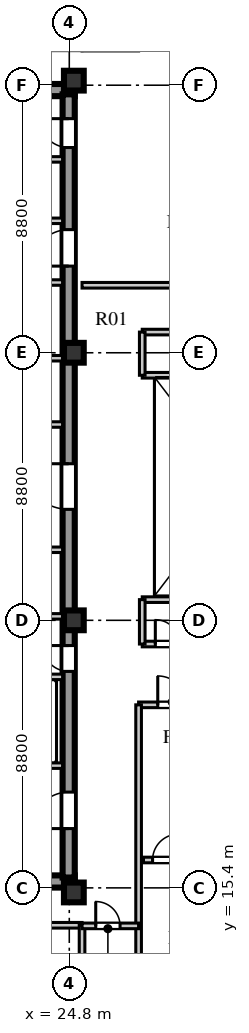
"""IFC4 building model, lengths in metres.
Left out: names, types, materials, properties, quantities, classifications, styles, units other than length and angle.
Written with IfcOpenShell. Run it as: python <this file> out.ifc"""

import sys

from ifc_helpers import new_model, si_unit, direction, frame, frame_2d, origin, origin_2d, place, context, subcontext, project, spatial, rectangle, extrude, element, fill, save


model = new_model("IFC4")
c1 = context("Model", 3, precision=1e-05, world=origin(), true_north=direction((0.0, 1.0)))
c2 = subcontext(c1, "Body", "Model", "MODEL_VIEW")
j1 = project(units=[si_unit("LENGTHUNIT", "METRE"), si_unit("PLANEANGLEUNIT", "RADIAN")], contexts=[c1])
p1 = place(None, origin())
s1 = spatial("IfcSite", under=j1, at=p1, CompositionType="ELEMENT")
p2 = place(p1, origin())
s2 = spatial("IfcBuilding", under=s1, at=p2, CompositionType="ELEMENT")
p3 = place(p2, frame((0.0, 0.0, 335.3)))
s3 = spatial("IfcBuildingStorey", under=s2, at=p3, CompositionType="ELEMENT", Elevation=335.3)
for number, where, z_axis, x_axis in (
    (1, (15.5, 15.61, 0.0), (0.0, 0.0, 1.0), (1.0, 0.0, 0.0)),
    (2, (15.5, 41.64, 0.0), (0.0, 0.0, 1.0), (1.0, 0.0, 0.0)),
):
    element("IfcWall", number, at=place(p3, frame(where, z_axis=z_axis, x_axis=x_axis)), inside=s3, PredefinedType="SHEAR", context=c2, shape_type="SweptSolid", body=[
        extrude(rectangle(XDim=9.48, YDim=0.4, at=frame_2d((4.74, 0.0))), origin(), (0.0, 0.0, 1.0), 3.56),
    ])
p4 = place(p3, frame((24.78, 15.74, 0.0), z_axis=(0.0, 0.0, 1.0), x_axis=(0.0, 1.0, 0.0)))
e3 = element("IfcWall", 3, at=p4, inside=s3, PredefinedType="SHEAR", context=c2, shape_type="SweptSolid", body=[
    extrude(rectangle(XDim=25.76, YDim=0.4, at=frame_2d((12.88, 0.0))), origin(), (0.0, 0.0, 1.0), 3.56),
])
p5 = place(p4, frame((1.61, 0.0, 0.0)))
e4 = element("IfcOpeningElement", 4, at=p5, cuts=e3, PredefinedType="OPENING", context=c2, shape_type="SweptSolid", body=[
    extrude(rectangle(XDim=1.2, YDim=2.1, at=frame_2d((0.6, 1.05))), frame((0.0, 0.21, 0.0), z_axis=(0.0, -1.0, 0.0), x_axis=(1.0, 0.0, 0.0)), (0.0, 0.0, 1.0), 0.42),
])
p6 = place(p4, frame((6.78, 0.0, 0.0)))
e5 = element("IfcOpeningElement", 5, at=p6, cuts=e3, PredefinedType="OPENING", context=c2, shape_type="SweptSolid", body=[
    extrude(rectangle(XDim=0.85, YDim=2.06, at=frame_2d((0.425, 1.03))), frame((0.0, 0.21, 0.0), z_axis=(0.0, -1.0, 0.0), x_axis=(1.0, 0.0, 0.0)), (0.0, 0.0, 1.0), 0.42),
])
p7 = place(p4, frame((12.11, 0.0, 0.0)))
e6 = element("IfcOpeningElement", 6, at=p7, cuts=e3, PredefinedType="OPENING", context=c2, shape_type="SweptSolid", body=[
    extrude(rectangle(XDim=1.5, YDim=2.12, at=frame_2d((0.75, 1.06))), frame((0.0, 0.21, 0.0), z_axis=(0.0, -1.0, 0.0), x_axis=(1.0, 0.0, 0.0)), (0.0, 0.0, 1.0), 0.42),
])
p8 = place(p4, frame((20.11, 0.0, 0.0)))
e7 = element("IfcOpeningElement", 7, at=p8, cuts=e3, PredefinedType="OPENING", context=c2, shape_type="SweptSolid", body=[
    extrude(rectangle(XDim=1.2, YDim=2.12, at=frame_2d((0.6, 1.06))), frame((0.0, 0.21, 0.0), z_axis=(0.0, -1.0, 0.0), x_axis=(1.0, 0.0, 0.0)), (0.0, 0.0, 1.0), 0.42),
])
p9 = place(p4, frame((24.01, 0.0, 0.0)))
e8 = element("IfcOpeningElement", 8, at=p9, cuts=e3, PredefinedType="OPENING", context=c2, shape_type="SweptSolid", body=[
    extrude(rectangle(XDim=0.95, YDim=2.1, at=frame_2d((0.475, 1.05))), frame((0.0, 0.21, 0.0), z_axis=(0.0, -1.0, 0.0), x_axis=(1.0, 0.0, 0.0)), (0.0, 0.0, 1.0), 0.42),
])
for number, where, z_axis, x_axis in (
    (9, (24.95, 15.25, 0.0), (0.0, 0.0, 1.0), (1.0, 0.0, 0.0)),
    (10, (24.95, 24.2, 0.0), (0.0, 0.0, 1.0), (1.0, 0.0, 0.0)),
    (11, (24.95, 33.0, 0.0), (0.0, 0.0, 1.0), (1.0, 0.0, 0.0)),
    (12, (24.95, 41.95, 0.0), (0.0, 0.0, 1.0), (1.0, 0.0, 0.0)),
):
    element("IfcColumn", number, at=place(p3, frame(where, z_axis=z_axis, x_axis=x_axis)), inside=s3, PredefinedType="COLUMN", context=c2, shape_type="SweptSolid", body=[
        extrude(rectangle(XDim=0.65, YDim=0.65, at=origin_2d()), origin(), (0.0, 0.0, 1.0), 3.56),
    ])
p10 = place(p3, frame((19.64, 19.42, 0.0), z_axis=(0.0, 0.0, 1.0), x_axis=(1.0, 0.0, 0.0)))
e13 = element("IfcWall", 13, at=p10, inside=s3, PredefinedType="SOLIDWALL", context=c2, shape_type="SweptSolid", body=[
    extrude(rectangle(XDim=4.94, YDim=0.18, at=frame_2d((2.47, 0.0))), origin(), (0.0, 0.0, 1.0), 3.56),
])
p11 = place(p10, frame((0.72, 0.0, 0.0)))
e14 = element("IfcOpeningElement", 14, at=p11, cuts=e13, PredefinedType="OPENING", context=c2, shape_type="SweptSolid", body=[
    extrude(rectangle(XDim=1.1, YDim=2.1, at=frame_2d((0.55, 1.05))), frame((0.0, 0.1, 0.0), z_axis=(0.0, -1.0, 0.0), x_axis=(1.0, 0.0, 0.0)), (0.0, 0.0, 1.0), 0.2),
])
p12 = place(p10, frame((3.02, 0.0, 0.0)))
e15 = element("IfcOpeningElement", 15, at=p12, cuts=e13, PredefinedType="OPENING", context=c2, shape_type="SweptSolid", body=[
    extrude(rectangle(XDim=1.1, YDim=2.1, at=frame_2d((0.55, 1.05))), frame((0.0, 0.1, 0.0), z_axis=(0.0, -1.0, 0.0), x_axis=(1.0, 0.0, 0.0)), (0.0, 0.0, 1.0), 0.2),
])
p13 = place(p3, frame((19.64, 22.34, 0.0), z_axis=(0.0, 0.0, 1.0), x_axis=(1.0, 0.0, 0.0)))
e16 = element("IfcWall", 16, at=p13, inside=s3, PredefinedType="SOLIDWALL", context=c2, shape_type="SweptSolid", body=[
    extrude(rectangle(XDim=4.94, YDim=0.18, at=frame_2d((2.47, 0.0))), origin(), (0.0, 0.0, 1.0), 3.56),
])
p14 = place(p3, frame((15.9, 26.52, 0.0), z_axis=(0.0, 0.0, 1.0), x_axis=(1.0, 0.0, 0.0)))
e17 = element("IfcWall", 17, at=p14, inside=s3, PredefinedType="SOLIDWALL", context=c2, shape_type="SweptSolid", body=[
    extrude(rectangle(XDim=8.68, YDim=0.18, at=frame_2d((4.34, 0.0))), origin(), (0.0, 0.0, 1.0), 3.56),
])
p15 = place(p14, frame((2.05, 0.0, 0.0)))
e18 = element("IfcOpeningElement", 18, at=p15, cuts=e17, PredefinedType="OPENING", context=c2, shape_type="SweptSolid", body=[
    extrude(rectangle(XDim=0.85, YDim=2.06, at=frame_2d((0.425, 1.03))), frame((0.0, 0.1, 0.0), z_axis=(0.0, -1.0, 0.0), x_axis=(1.0, 0.0, 0.0)), (0.0, 0.0, 1.0), 0.2),
])
p16 = place(p14, frame((5.2, 0.0, 0.0)))
e19 = element("IfcOpeningElement", 19, at=p16, cuts=e17, PredefinedType="OPENING", context=c2, shape_type="SweptSolid", body=[
    extrude(rectangle(XDim=0.95, YDim=2.1, at=frame_2d((0.475, 1.05))), frame((0.0, 0.1, 0.0), z_axis=(0.0, -1.0, 0.0), x_axis=(1.0, 0.0, 0.0)), (0.0, 0.0, 1.0), 0.2),
])
p17 = place(p3, frame((15.9, 24.33, 0.0), z_axis=(0.0, 0.0, 1.0), x_axis=(1.0, 0.0, 0.0)))
e20 = element("IfcWall", 20, at=p17, inside=s3, PredefinedType="SOLIDWALL", context=c2, shape_type="SweptSolid", body=[
    extrude(rectangle(XDim=8.68, YDim=0.18, at=frame_2d((4.34, 0.0))), origin(), (0.0, 0.0, 1.0), 2.96),
])
p18 = place(p3, frame((15.9, 30.64, 0.0), z_axis=(0.0, 0.0, 1.0), x_axis=(1.0, 0.0, 0.0)))
e21 = element("IfcWall", 21, at=p18, inside=s3, PredefinedType="SOLIDWALL", context=c2, shape_type="SweptSolid", body=[
    extrude(rectangle(XDim=8.68, YDim=0.18, at=frame_2d((4.34, 0.0))), origin(), (0.0, 0.0, 1.0), 3.56),
])
p19 = place(p18, frame((3.7, 0.0, 0.0)))
e22 = element("IfcOpeningElement", 22, at=p19, cuts=e21, PredefinedType="OPENING", context=c2, shape_type="SweptSolid", body=[
    extrude(rectangle(XDim=0.95, YDim=2.1, at=frame_2d((0.475, 1.05))), frame((0.0, 0.1, 0.0), z_axis=(0.0, -1.0, 0.0), x_axis=(1.0, 0.0, 0.0)), (0.0, 0.0, 1.0), 0.2),
])
p20 = place(p3, frame((15.9, 32.82, 0.0), z_axis=(0.0, 0.0, 1.0), x_axis=(1.0, 0.0, 0.0)))
e23 = element("IfcWall", 23, at=p20, inside=s3, PredefinedType="SOLIDWALL", context=c2, shape_type="SweptSolid", body=[
    extrude(rectangle(XDim=8.68, YDim=0.18, at=frame_2d((4.34, 0.0))), origin(), (0.0, 0.0, 1.0), 2.96),
])
p21 = place(p3, frame((22.02, 35.31, 0.0), z_axis=(0.0, 0.0, 1.0), x_axis=(1.0, 0.0, 0.0)))
e24 = element("IfcWall", 24, at=p21, inside=s3, PredefinedType="SOLIDWALL", context=c2, shape_type="SweptSolid", body=[
    extrude(rectangle(XDim=2.56, YDim=0.18, at=frame_2d((1.28, 0.0))), origin(), (0.0, 0.0, 1.0), 3.56),
])
p22 = place(p21, frame((0.55, 0.0, 0.0)))
e25 = element("IfcOpeningElement", 25, at=p22, cuts=e24, PredefinedType="OPENING", context=c2, shape_type="SweptSolid", body=[
    extrude(rectangle(XDim=1.0, YDim=2.1, at=frame_2d((0.5, 1.05))), frame((0.0, 0.1, 0.0), z_axis=(0.0, -1.0, 0.0), x_axis=(1.0, 0.0, 0.0)), (0.0, 0.0, 1.0), 0.2),
])
p23 = place(p3, frame((19.64, 37.34, 0.0), z_axis=(0.0, 0.0, 1.0), x_axis=(1.0, 0.0, 0.0)))
e26 = element("IfcWall", 26, at=p23, inside=s3, PredefinedType="SOLIDWALL", context=c2, shape_type="SweptSolid", body=[
    extrude(rectangle(XDim=4.94, YDim=0.18, at=frame_2d((2.47, 0.0))), origin(), (0.0, 0.0, 1.0), 3.56),
])
p24 = place(p23, frame((0.45, 0.0, 0.0)))
e27 = element("IfcOpeningElement", 27, at=p24, cuts=e26, PredefinedType="OPENING", context=c2, shape_type="SweptSolid", body=[
    extrude(rectangle(XDim=1.0, YDim=2.1, at=frame_2d((0.5, 1.05))), frame((0.0, 0.1, 0.0), z_axis=(0.0, -1.0, 0.0), x_axis=(1.0, 0.0, 0.0)), (0.0, 0.0, 1.0), 0.2),
])
p25 = place(p23, frame((2.5, 0.0, 0.0)))
e28 = element("IfcOpeningElement", 28, at=p25, cuts=e26, PredefinedType="OPENING", context=c2, shape_type="SweptSolid", body=[
    extrude(rectangle(XDim=1.0, YDim=2.1, at=frame_2d((0.5, 1.05))), frame((0.0, 0.1, 0.0), z_axis=(0.0, -1.0, 0.0), x_axis=(1.0, 0.0, 0.0)), (0.0, 0.0, 1.0), 0.2),
])
p26 = place(p3, frame((19.64, 39.36, 0.0), z_axis=(0.0, 0.0, 1.0), x_axis=(1.0, 0.0, 0.0)))
e29 = element("IfcWall", 29, at=p26, inside=s3, PredefinedType="SOLIDWALL", context=c2, shape_type="SweptSolid", body=[
    extrude(rectangle(XDim=4.94, YDim=0.18, at=frame_2d((2.47, 0.0))), origin(), (0.0, 0.0, 1.0), 3.56),
])
p27 = place(p3, frame((27.08, 21.42, 0.0), z_axis=(0.0, 0.0, 1.0), x_axis=(1.0, 0.0, 0.0)))
e30 = element("IfcWall", 30, at=p27, inside=s3, PredefinedType="SOLIDWALL", context=c2, shape_type="SweptSolid", body=[
    extrude(rectangle(XDim=8.17, YDim=0.185, at=frame_2d((4.085, 0.0))), origin(), (0.0, 0.0, 1.0), 3.26),
])
p28 = place(p27, frame((0.63, 0.0, 0.0)))
e31 = element("IfcOpeningElement", 31, at=p28, cuts=e30, PredefinedType="OPENING", context=c2, shape_type="SweptSolid", body=[
    extrude(rectangle(XDim=0.95, YDim=2.1, at=frame_2d((0.475, 1.05))), frame((0.0, 0.103, 0.0), z_axis=(0.0, -1.0, 0.0), x_axis=(1.0, 0.0, 0.0)), (0.0, 0.0, 1.0), 0.205),
])
p29 = place(p3, frame((27.08, 11.68, 0.0), z_axis=(0.0, 0.0, 1.0), x_axis=(0.0, 1.0, 0.0)))
e32 = element("IfcWall", 32, at=p29, inside=s3, PredefinedType="SOLIDWALL", context=c2, shape_type="SweptSolid", body=[
    extrude(rectangle(XDim=9.74, YDim=0.185, at=frame_2d((4.87, 0.0))), origin(), (0.0, 0.0, 1.0), 3.56),
])
p30 = place(p3, frame((25.22, 35.22, 0.0), z_axis=(0.0, 0.0, 1.0), x_axis=(1.0, 0.0, 0.0)))
e33 = element("IfcWall", 33, at=p30, inside=s3, PredefinedType="SOLIDWALL", context=c2, shape_type="SweptSolid", body=[
    extrude(rectangle(XDim=9.5, YDim=0.185, at=frame_2d((4.75, 0.0))), origin(), (0.0, 0.0, 1.0), 3.56),
])
p31 = place(p30, frame((3.2, 0.0, 0.0)))
e34 = element("IfcOpeningElement", 34, at=p31, cuts=e33, PredefinedType="OPENING", context=c2, shape_type="SweptSolid", body=[
    extrude(rectangle(XDim=1.0, YDim=2.08, at=frame_2d((0.5, 1.04))), frame((0.0, 0.103, 0.0), z_axis=(0.0, -1.0, 0.0), x_axis=(1.0, 0.0, 0.0)), (0.0, 0.0, 1.0), 0.205),
])
p32 = place(p30, frame((6.2, 0.0, 0.0)))
e35 = element("IfcOpeningElement", 35, at=p32, cuts=e33, PredefinedType="OPENING", context=c2, shape_type="SweptSolid", body=[
    extrude(rectangle(XDim=0.9, YDim=2.08, at=frame_2d((0.45, 1.04))), frame((0.0, 0.103, 0.0), z_axis=(0.0, -1.0, 0.0), x_axis=(1.0, 0.0, 0.0)), (0.0, 0.0, 1.0), 0.205),
])
p33 = place(p3, frame((14.15, 14.17, 0.0), z_axis=(0.0, 0.0, 1.0), x_axis=(1.0, 0.0, 0.0)))
e36 = element("IfcWall", 36, at=p33, inside=s3, PredefinedType="SOLIDWALL", context=c2, shape_type="SweptSolid", body=[
    extrude(rectangle(XDim=11.07, YDim=0.185, at=frame_2d((5.535, 0.0))), origin(), (0.0, 0.0, 1.0), 3.56),
])
p34 = place(p33, frame((3.2, 0.0, 0.0)))
e37 = element("IfcOpeningElement", 37, at=p34, cuts=e36, PredefinedType="OPENING", context=c2, shape_type="SweptSolid", body=[
    extrude(rectangle(XDim=0.95, YDim=2.08, at=frame_2d((0.475, 1.04))), frame((0.0, 0.103, 0.0), z_axis=(0.0, -1.0, 0.0), x_axis=(1.0, 0.0, 0.0)), (0.0, 0.0, 1.0), 0.205),
])
p35 = place(p3, frame((25.22, 11.68, 0.0), z_axis=(0.0, 0.0, 1.0), x_axis=(0.0, 1.0, 0.0)))
e38 = element("IfcWall", 38, at=p35, inside=s3, PredefinedType="SOLIDWALL", context=c2, shape_type="SweptSolid", body=[
    extrude(rectangle(XDim=2.49, YDim=0.185, at=frame_2d((1.245, 0.0))), origin(), (0.0, 0.0, 1.0), 3.11),
])
p36 = place(p3, frame((27.24, 16.317, 0.0), z_axis=(0.0, 0.0, 1.0), x_axis=(1.0, 0.0, 0.0)))
e39 = element("IfcWall", 39, at=p36, inside=s3, PredefinedType="SOLIDWALL", context=c2, shape_type="SweptSolid", body=[
    extrude(rectangle(XDim=8.16, YDim=0.185, at=frame_2d((4.08, 0.0))), origin(), (0.0, 0.0, 1.0), 3.56),
])
p37 = place(p36, frame((0.3, 0.0, 0.0)))
e40 = element("IfcOpeningElement", 40, at=p37, cuts=e39, PredefinedType="OPENING", context=c2, shape_type="SweptSolid", body=[
    extrude(rectangle(XDim=0.85, YDim=2.08, at=frame_2d((0.425, 1.04))), frame((0.0, 0.103, 0.0), z_axis=(0.0, -1.0, 0.0), x_axis=(1.0, 0.0, 0.0)), (0.0, 0.0, 1.0), 0.205),
])
p38 = place(p36, frame((3.09, 0.0, 0.0)))
e41 = element("IfcOpeningElement", 41, at=p38, cuts=e39, PredefinedType="OPENING", context=c2, shape_type="SweptSolid", body=[
    extrude(rectangle(XDim=0.85, YDim=2.08, at=frame_2d((0.425, 1.04))), frame((0.0, 0.103, 0.0), z_axis=(0.0, -1.0, 0.0), x_axis=(1.0, 0.0, 0.0)), (0.0, 0.0, 1.0), 0.205),
])
p39 = place(p3, frame((27.2, 23.42, 0.0), z_axis=(0.0, 0.0, 1.0), x_axis=(1.0, 0.0, 0.0)))
e42 = element("IfcWall", 42, at=p39, inside=s3, PredefinedType="SOLIDWALL", context=c2, shape_type="SweptSolid", body=[
    extrude(rectangle(XDim=6.82, YDim=0.185, at=frame_2d((3.41, 0.0))), origin(), (0.0, 0.0, 1.0), 3.56),
])
p40 = place(p39, frame((0.43, 0.0, 0.0)))
e43 = element("IfcOpeningElement", 43, at=p40, cuts=e42, PredefinedType="OPENING", context=c2, shape_type="SweptSolid", body=[
    extrude(rectangle(XDim=0.8, YDim=2.05, at=frame_2d((0.4, 1.025))), frame((0.0, 0.103, 0.0), z_axis=(0.0, -1.0, 0.0), x_axis=(1.0, 0.0, 0.0)), (0.0, 0.0, 1.0), 0.205),
])
p41 = place(p3, frame((27.2, 24.88, 0.0), z_axis=(0.0, 0.0, 1.0), x_axis=(1.0, 0.0, 0.0)))
e44 = element("IfcWall", 44, at=p41, inside=s3, PredefinedType="SOLIDWALL", context=c2, shape_type="SweptSolid", body=[
    extrude(rectangle(XDim=6.82, YDim=0.185, at=frame_2d((3.41, 0.0))), origin(), (0.0, 0.0, 1.0), 3.01),
])
p42 = place(p3, frame((27.2, 23.42, 0.0), z_axis=(0.0, 0.0, 1.0), x_axis=(0.0, 1.0, 0.0)))
e45 = element("IfcWall", 45, at=p42, inside=s3, PredefinedType="SOLIDWALL", context=c2, shape_type="SweptSolid", body=[
    extrude(rectangle(XDim=1.46, YDim=0.185, at=frame_2d((0.73, 0.0))), origin(), (0.0, 0.0, 1.0), 3.56),
])
p43 = place(p3, frame((25.22, 14.15, 0.0), z_axis=(0.0, 0.0, 1.0), x_axis=(1.0, 0.0, 0.0)))
e46 = element("IfcWall", 46, at=p43, inside=s3, PredefinedType="SOLIDWALL", context=c2, shape_type="SweptSolid", body=[
    extrude(rectangle(XDim=1.86, YDim=0.185, at=frame_2d((0.93, 0.0))), origin(), (0.0, 0.0, 1.0), 3.56),
])
p44 = place(p43, frame((0.45, 0.0, 0.0)))
e47 = element("IfcOpeningElement", 47, at=p44, cuts=e46, PredefinedType="OPENING", context=c2, shape_type="SweptSolid", body=[
    extrude(rectangle(XDim=0.8, YDim=2.05, at=frame_2d((0.4, 1.025))), frame((0.0, 0.103, 0.0), z_axis=(0.0, -1.0, 0.0), x_axis=(1.0, 0.0, 0.0)), (0.0, 0.0, 1.0), 0.205),
])
p45 = place(p3, frame((27.2, 33.68, 0.0), z_axis=(0.0, 0.0, 1.0), x_axis=(1.0, 0.0, 0.0)))
e48 = element("IfcWall", 48, at=p45, inside=s3, PredefinedType="SOLIDWALL", context=c2, shape_type="SweptSolid", body=[
    extrude(rectangle(XDim=6.2, YDim=0.185, at=frame_2d((3.1, 0.0))), origin(), (0.0, 0.0, 1.0), 3.56),
])
p46 = place(p45, frame((1.2, 0.0, 0.0)))
e49 = element("IfcOpeningElement", 49, at=p46, cuts=e48, PredefinedType="OPENING", context=c2, shape_type="SweptSolid", body=[
    extrude(rectangle(XDim=0.8, YDim=2.05, at=frame_2d((0.4, 1.025))), frame((0.0, 0.103, 0.0), z_axis=(0.0, -1.0, 0.0), x_axis=(1.0, 0.0, 0.0)), (0.0, 0.0, 1.0), 0.205),
])
p47 = place(p3, frame((27.2, 32.26, 0.0), z_axis=(0.0, 0.0, 1.0), x_axis=(1.0, 0.0, 0.0)))
e50 = element("IfcWall", 50, at=p47, inside=s3, PredefinedType="SOLIDWALL", context=c2, shape_type="SweptSolid", body=[
    extrude(rectangle(XDim=6.2, YDim=0.185, at=frame_2d((3.1, 0.0))), origin(), (0.0, 0.0, 1.0), 3.01),
])
p48 = place(p3, frame((27.2, 32.26, 0.0), z_axis=(0.0, 0.0, 1.0), x_axis=(0.0, 1.0, 0.0)))
e51 = element("IfcWall", 51, at=p48, inside=s3, PredefinedType="SOLIDWALL", context=c2, shape_type="SweptSolid", body=[
    extrude(rectangle(XDim=1.42, YDim=0.185, at=frame_2d((0.71, 0.0))), origin(), (0.0, 0.0, 1.0), 3.56),
])
p49 = place(p5, frame((1.2, 0.0, 0.0), z_axis=(0.0, 0.0, 1.0), x_axis=(-1.0, 0.0, 0.0)))
e52 = element("IfcDoor", 52, at=p49, inside=s3, OperationType="SINGLE_SWING_RIGHT", PredefinedType="DOOR", context=c2, shape_type="SweptSolid", body=[
    extrude(rectangle(XDim=1.2, YDim=2.1, at=frame_2d((0.6, 1.05))), frame((0.0, 0.025, 0.0), z_axis=(0.0, -1.0, 0.0), x_axis=(1.0, 0.0, 0.0)), (0.0, 0.0, 1.0), 0.05),
])
fill(e4, e52)
p50 = place(p6, frame((0.85, 0.0, 0.0), z_axis=(0.0, 0.0, 1.0), x_axis=(-1.0, 0.0, 0.0)))
e53 = element("IfcDoor", 53, at=p50, inside=s3, OperationType="SINGLE_SWING_LEFT", PredefinedType="DOOR", context=c2, shape_type="SweptSolid", body=[
    extrude(rectangle(XDim=0.85, YDim=2.06, at=frame_2d((0.425, 1.03))), frame((0.0, 0.025, 0.0), z_axis=(0.0, -1.0, 0.0), x_axis=(1.0, 0.0, 0.0)), (0.0, 0.0, 1.0), 0.05),
])
fill(e5, e53)
p51 = place(p7, frame((1.5, 0.0, 0.0), z_axis=(0.0, 0.0, 1.0), x_axis=(-1.0, 0.0, 0.0)))
e54 = element("IfcDoor", 54, at=p51, inside=s3, OperationType="SINGLE_SWING_LEFT", PredefinedType="DOOR", context=c2, shape_type="SweptSolid", body=[
    extrude(rectangle(XDim=1.5, YDim=2.12, at=frame_2d((0.75, 1.06))), frame((0.0, 0.025, 0.0), z_axis=(0.0, -1.0, 0.0), x_axis=(1.0, 0.0, 0.0)), (0.0, 0.0, 1.0), 0.05),
])
fill(e6, e54)
p52 = place(p8, frame((1.2, 0.0, 0.0), z_axis=(0.0, 0.0, 1.0), x_axis=(-1.0, 0.0, 0.0)))
e55 = element("IfcDoor", 55, at=p52, inside=s3, OperationType="SINGLE_SWING_RIGHT", PredefinedType="DOOR", context=c2, shape_type="SweptSolid", body=[
    extrude(rectangle(XDim=1.2, YDim=2.12, at=frame_2d((0.6, 1.06))), frame((0.0, 0.025, 0.0), z_axis=(0.0, -1.0, 0.0), x_axis=(1.0, 0.0, 0.0)), (0.0, 0.0, 1.0), 0.05),
])
fill(e7, e55)
p53 = place(p9, frame((0.95, 0.0, 0.0), z_axis=(0.0, 0.0, 1.0), x_axis=(-1.0, 0.0, 0.0)))
e56 = element("IfcDoor", 56, at=p53, inside=s3, OperationType="SINGLE_SWING_LEFT", PredefinedType="DOOR", context=c2, shape_type="SweptSolid", body=[
    extrude(rectangle(XDim=0.95, YDim=2.1, at=frame_2d((0.475, 1.05))), frame((0.0, 0.025, 0.0), z_axis=(0.0, -1.0, 0.0), x_axis=(1.0, 0.0, 0.0)), (0.0, 0.0, 1.0), 0.05),
])
fill(e8, e56)
p54 = place(p37, frame((0.85, 0.0, 0.0), z_axis=(0.0, 0.0, 1.0), x_axis=(-1.0, 0.0, 0.0)))
e57 = element("IfcDoor", 57, at=p54, inside=s3, OperationType="SINGLE_SWING_LEFT", PredefinedType="DOOR", context=c2, shape_type="SweptSolid", body=[
    extrude(rectangle(XDim=0.85, YDim=2.08, at=frame_2d((0.425, 1.04))), frame((0.0, 0.025, 0.0), z_axis=(0.0, -1.0, 0.0), x_axis=(1.0, 0.0, 0.0)), (0.0, 0.0, 1.0), 0.05),
])
fill(e40, e57)
p55 = place(p28, frame((0.95, 0.0, 0.0), z_axis=(0.0, 0.0, 1.0), x_axis=(-1.0, 0.0, 0.0)))
e58 = element("IfcDoor", 58, at=p55, inside=s3, OperationType="SINGLE_SWING_RIGHT", PredefinedType="DOOR", context=c2, shape_type="SweptSolid", body=[
    extrude(rectangle(XDim=0.95, YDim=2.1, at=frame_2d((0.475, 1.05))), frame((0.0, 0.025, 0.0), z_axis=(0.0, -1.0, 0.0), x_axis=(1.0, 0.0, 0.0)), (0.0, 0.0, 1.0), 0.05),
])
fill(e31, e58)
p56 = place(p40, origin())
e59 = element("IfcDoor", 59, at=p56, inside=s3, OperationType="SINGLE_SWING_LEFT", PredefinedType="DOOR", context=c2, shape_type="SweptSolid", body=[
    extrude(rectangle(XDim=0.8, YDim=2.05, at=frame_2d((0.4, 1.025))), frame((0.0, 0.025, 0.0), z_axis=(0.0, -1.0, 0.0), x_axis=(1.0, 0.0, 0.0)), (0.0, 0.0, 1.0), 0.05),
])
fill(e43, e59)
p57 = place(p44, origin())
e60 = element("IfcDoor", 60, at=p57, inside=s3, OperationType="SINGLE_SWING_LEFT", PredefinedType="DOOR", context=c2, shape_type="SweptSolid", body=[
    extrude(rectangle(XDim=0.8, YDim=2.05, at=frame_2d((0.4, 1.025))), frame((0.0, 0.025, 0.0), z_axis=(0.0, -1.0, 0.0), x_axis=(1.0, 0.0, 0.0)), (0.0, 0.0, 1.0), 0.05),
])
fill(e47, e60)
save(model, sys.argv[1])
